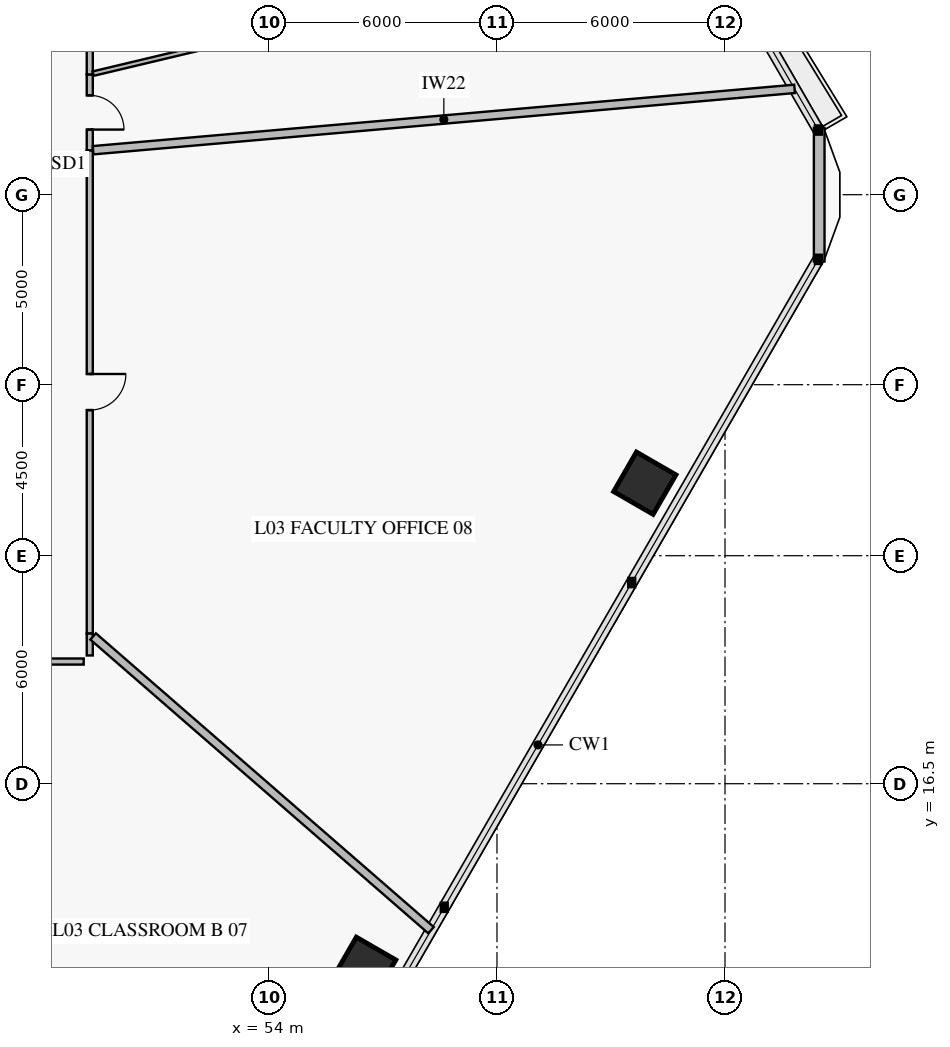
"""IFC4 building model, lengths in metres.
Left out: names, types, materials, properties, quantities, classifications, styles, units other than length and angle.
Written with IfcOpenShell. Run it as: python <this file> out.ifc"""

import sys

from ifc_helpers import new_model, si_unit, direction, frame, frame_2d, origin, origin_2d, place, context, subcontext, project, spatial, rectangle, extrude, element, fill, save


model = new_model("IFC4")
c1 = context("Model", 3, precision=1e-05, world=origin(), true_north=direction((0.0, 1.0)))
c2 = subcontext(c1, "Body", "Model", "MODEL_VIEW")
j1 = project(units=[si_unit("LENGTHUNIT", "METRE"), si_unit("PLANEANGLEUNIT", "RADIAN")], contexts=[c1])
p1 = place(None, origin())
s1 = spatial("IfcSite", under=j1, at=p1, CompositionType="ELEMENT")
p2 = place(p1, origin())
s2 = spatial("IfcBuilding", under=s1, at=p2, CompositionType="ELEMENT")
p3 = place(p2, frame((0.0, 0.0, 12.0)))
s3 = spatial("IfcBuildingStorey", under=s2, at=p3, CompositionType="ELEMENT", Elevation=12.0)
for number, where, z_axis, x_axis in (
    (1, (56.519, 11.643, 0.0), (0.0, 0.0, 1.0), (0.5, 0.866, 0.0)),
    (2, (63.889, 24.408, 0.0), (0.0, 0.0, 1.0), (0.5, 0.866, 0.0)),
):
    element("IfcColumn", number, at=place(p3, frame(where, z_axis=z_axis, x_axis=x_axis)), inside=s3, PredefinedType="COLUMN", context=c2, shape_type="SweptSolid", body=[
        extrude(rectangle(XDim=1.2, YDim=1.2, at=origin_2d()), origin(), (0.0, 0.0, 1.0), 3.92),
    ])
p4 = place(p3, frame((68.479, 33.758, 0.0), z_axis=(0.0, 0.0, 1.0), x_axis=(0.0, -1.0, 0.0)))
e3 = element("IfcWall", 3, at=p4, inside=s3, PredefinedType="SOLIDWALL", context=c2, shape_type="SweptSolid", body=[
    extrude(rectangle(XDim=3.515, YDim=0.28, at=frame_2d((1.758, 0.0))), origin(), (0.0, 0.0, 1.0), 3.92),
])
p5 = place(p3, frame((49.285, 33.162, 0.0), z_axis=(0.0, 0.0, 1.0), x_axis=(0.0, 1.0, 0.0)))
e4 = element("IfcWall", 4, at=p5, inside=s3, PredefinedType="PARTITIONING", context=c2, shape_type="SweptSolid", body=[
    extrude(rectangle(XDim=2.002, YDim=0.16, at=frame_2d((1.001, 0.0))), origin(), (0.0, 0.0, 1.0), 3.92),
])
p6 = place(p5, frame((0.551, 0.0, 0.0)))
e5 = element("IfcOpeningElement", 5, at=p6, cuts=e4, PredefinedType="OPENING", context=c2, shape_type="SweptSolid", body=[
    extrude(rectangle(XDim=0.9, YDim=2.1, at=frame_2d((0.45, 1.05))), frame((0.0, 0.092, 0.0), z_axis=(0.0, -1.0, 0.0), x_axis=(1.0, 0.0, 0.0)), (0.0, 0.0, 1.0), 0.184),
])
p7 = place(p3, frame((49.285, 35.165, 0.0), z_axis=(0.0, 0.0, 1.0), x_axis=(0.0, 1.0, 0.0)))
e6 = element("IfcWall", 6, at=p7, inside=s3, PredefinedType="PARTITIONING", context=c2, shape_type="SweptSolid", body=[
    extrude(rectangle(XDim=2.149, YDim=0.16, at=frame_2d((1.074, 0.0))), origin(), (0.0, 0.0, 1.0), 3.22),
])
p8 = place(p7, frame((0.624, 0.0, 0.0)))
e7 = element("IfcOpeningElement", 7, at=p8, cuts=e6, PredefinedType="OPENING", context=c2, shape_type="SweptSolid", body=[
    extrude(rectangle(XDim=0.9, YDim=2.1, at=frame_2d((0.45, 1.05))), frame((0.0, 0.092, 0.0), z_axis=(0.0, -1.0, 0.0), x_axis=(1.0, 0.0, 0.0)), (0.0, 0.0, 1.0), 0.184),
])
p9 = place(p3, frame((41.992, 19.715, 0.0), z_axis=(0.0, 0.0, 1.0), x_axis=(1.0, 0.0, 0.0)))
e8 = element("IfcWall", 8, at=p9, inside=s3, PredefinedType="PARTITIONING", context=c2, shape_type="SweptSolid", body=[
    extrude(rectangle(XDim=7.133, YDim=0.16, at=frame_2d((3.567, 0.0))), origin(), (0.0, 0.0, 1.0), 3.22),
])
p10 = place(p9, frame((2.992, 0.0, 0.0)))
e9 = element("IfcOpeningElement", 9, at=p10, cuts=e8, PredefinedType="OPENING", context=c2, shape_type="SweptSolid", body=[
    extrude(rectangle(XDim=1.15, YDim=2.2, at=frame_2d((0.575, 1.1))), frame((0.0, 0.092, 0.0), z_axis=(0.0, -1.0, 0.0), x_axis=(1.0, 0.0, 0.0)), (0.0, 0.0, 1.0), 0.184),
])
p11 = place(p3, frame((49.285, 20.451, 0.0), z_axis=(0.0, 0.0, 1.0), x_axis=(0.0, 1.0, 0.0)))
e10 = element("IfcWall", 10, at=p11, inside=s3, PredefinedType="PARTITIONING", context=c2, shape_type="SweptSolid", body=[
    extrude(rectangle(XDim=12.711, YDim=0.16, at=frame_2d((6.355, 0.0))), origin(), (0.0, 0.0, 1.0), 3.22),
])
p12 = place(p11, frame((5.88, 0.0, 0.0)))
e11 = element("IfcOpeningElement", 11, at=p12, cuts=e10, PredefinedType="OPENING", context=c2, shape_type="SweptSolid", body=[
    extrude(rectangle(XDim=0.95, YDim=2.1, at=frame_2d((0.475, 1.05))), frame((0.0, 0.092, 0.0), z_axis=(0.0, -1.0, 0.0), x_axis=(1.0, 0.0, 0.0)), (0.0, 0.0, 1.0), 0.184),
])
p13 = place(p3, frame((49.373, 33.17, 0.0), z_axis=(0.0, 0.0, 1.0), x_axis=(0.99619391773, 0.087164661858, 0.0)))
e12 = element("IfcWall", 12, at=p13, inside=s3, PredefinedType="PARTITIONING", context=c2, shape_type="SweptSolid", body=[
    extrude(rectangle(XDim=18.528, YDim=0.22, at=frame_2d((9.264, 0.0))), origin(), (0.0, 0.0, 1.0), 3.17),
])
p14 = place(p3, frame((49.373, 35.186, 0.0), z_axis=(0.0, 0.0, 1.0), x_axis=(0.972774396977, 0.231754120968, 0.0)))
e13 = element("IfcWall", 13, at=p14, inside=s3, PredefinedType="PARTITIONING", context=c2, shape_type="SweptSolid", body=[
    extrude(rectangle(XDim=16.471, YDim=0.12, at=frame_2d((8.235, 0.0))), origin(), (0.0, 0.0, 1.0), 3.17),
])
p15 = place(p3, frame((42.035, 19.627, 0.0), z_axis=(0.0, 0.0, 1.0), x_axis=(0.438375147569, -0.898792094977, 0.0)))
e14 = element("IfcWall", 14, at=p15, inside=s3, PredefinedType="PARTITIONING", context=c2, shape_type="SweptSolid", body=[
    extrude(rectangle(XDim=18.453, YDim=0.22, at=frame_2d((9.227, 0.0))), origin(), (0.0, 0.0, 1.0), 3.17),
])
p16 = place(p3, frame((49.285, 19.875, 0.0), z_axis=(0.0, 0.0, 1.0), x_axis=(0.0, 1.0, 0.0)))
e15 = element("IfcWall", 15, at=p16, inside=s3, PredefinedType="PARTITIONING", context=c2, shape_type="SweptSolid", body=[
    extrude(rectangle(XDim=0.576, YDim=0.16, at=frame_2d((0.288, 0.0))), origin(), (0.0, 0.0, 1.0), 3.92),
])
p17 = place(p3, frame((49.373, 20.375, 0.0), z_axis=(0.0, 0.0, 1.0), x_axis=(0.754715261602, -0.656052493254, 0.0)))
e16 = element("IfcWall", 16, at=p17, inside=s3, PredefinedType="PARTITIONING", context=c2, shape_type="SweptSolid", body=[
    extrude(rectangle(XDim=11.781, YDim=0.22, at=frame_2d((5.891, 0.0))), origin(), (0.0, 0.0, 1.0), 3.17),
])
p18 = place(p6, frame((0.9, 0.0, 0.0), z_axis=(0.0, 0.0, 1.0), x_axis=(-1.0, 0.0, 0.0)))
e17 = element("IfcDoor", 17, at=p18, inside=s3, OperationType="SINGLE_SWING_RIGHT", PredefinedType="DOOR", context=c2, shape_type="SweptSolid", body=[
    extrude(rectangle(XDim=0.9, YDim=2.1, at=frame_2d((0.45, 1.05))), frame((0.0, 0.025, 0.0), z_axis=(0.0, -1.0, 0.0), x_axis=(1.0, 0.0, 0.0)), (0.0, 0.0, 1.0), 0.05),
])
fill(e5, e17)
p19 = place(p12, frame((0.95, 0.0, 0.0), z_axis=(0.0, 0.0, 1.0), x_axis=(-1.0, 0.0, 0.0)))
e18 = element("IfcDoor", 18, at=p19, inside=s3, OperationType="SINGLE_SWING_LEFT", PredefinedType="DOOR", context=c2, shape_type="SweptSolid", body=[
    extrude(rectangle(XDim=0.95, YDim=2.1, at=frame_2d((0.475, 1.05))), frame((0.0, 0.025, 0.0), z_axis=(0.0, -1.0, 0.0), x_axis=(1.0, 0.0, 0.0)), (0.0, 0.0, 1.0), 0.05),
])
fill(e11, e18)
save(model, sys.argv[1])
